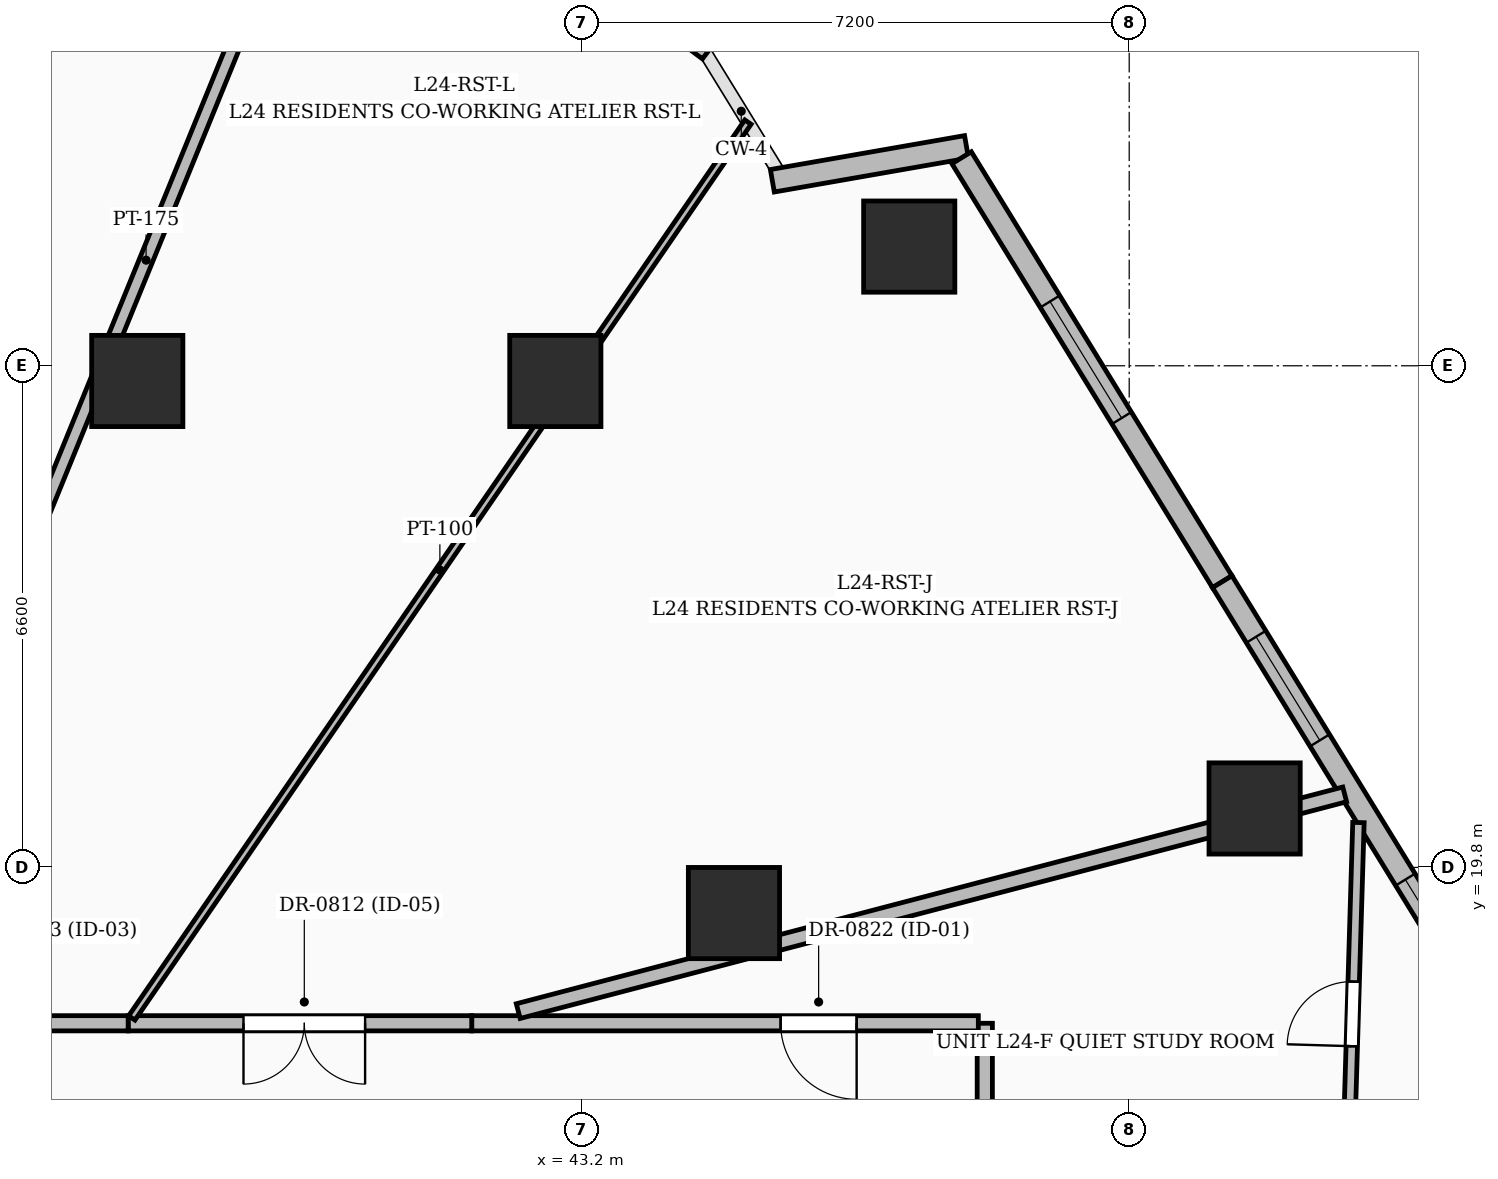
"""IFC4 building model, lengths in metres.
Left out: names, types, materials, properties, quantities, classifications, styles, units other than length and angle.
Written with IfcOpenShell. Run it as: python <this file> out.ifc"""

import sys

from ifc_helpers import new_model, si_unit, direction, frame, frame_2d, origin, origin_2d, place, context, subcontext, project, spatial, rectangle, extrude, element, fill, save


model = new_model("IFC4")
c1 = context("Model", 3, precision=1e-05, world=origin(), true_north=direction((0.0, 1.0)))
c2 = subcontext(c1, "Body", "Model", "MODEL_VIEW")
j1 = project(units=[si_unit("LENGTHUNIT", "METRE"), si_unit("PLANEANGLEUNIT", "RADIAN")], contexts=[c1])
p1 = place(None, origin())
s1 = spatial("IfcSite", under=j1, at=p1, CompositionType="ELEMENT")
p2 = place(p1, origin())
s2 = spatial("IfcBuilding", under=s1, at=p2, CompositionType="ELEMENT")
p3 = place(p2, frame((0.0, 0.0, 96.6)))
s3 = spatial("IfcBuildingStorey", under=s2, at=p3, CompositionType="ELEMENT", Elevation=96.6)
for number, where, z_axis, x_axis in (
    (1, (45.2, 19.2, 0.0), (0.0, 0.0, 1.0), (1.0, 0.0, 0.0)),
    (2, (42.85, 26.2, 0.0), (0.0, 0.0, 1.0), (1.0, 0.0, 0.0)),
    (3, (37.35, 26.2, 0.0), (0.0, 0.0, 1.0), (1.0, 0.0, 0.0)),
    (4, (52.05, 20.576, 0.0), (0.0, 0.0, 1.0), (1.0, 0.0, 0.0)),
    (5, (47.506, 27.968, 0.0), (0.0, 0.0, 1.0), (1.0, 0.0, 0.0)),
):
    element("IfcColumn", number, at=place(p3, frame(where, z_axis=z_axis, x_axis=x_axis)), inside=s3, PredefinedType="COLUMN", context=c2, shape_type="SweptSolid", body=[
        extrude(rectangle(XDim=1.2, YDim=1.2, at=origin_2d()), origin(), (0.0, 0.0, 1.0), 3.6),
    ])
p4 = place(p3, frame((46.051, 32.385, 0.0), z_axis=(0.0, 0.0, 1.0), x_axis=(-0.597942033265, -0.801539347041, 0.0)))
e6 = element("IfcWall", 6, at=p4, inside=s3, PredefinedType="SOLIDWALL", context=c2, shape_type="SweptSolid", body=[
    extrude(rectangle(XDim=2.318, YDim=0.3, at=frame_2d((1.159, 0.0))), origin(), (0.0, 0.0, 1.0), 2.325),
])
p5 = place(p3, frame((45.705, 28.834, 0.0), z_axis=(0.0, 0.0, 1.0), x_axis=(0.985100314999, 0.171980723889, 0.0)))
e7 = element("IfcWall", 7, at=p5, inside=s3, PredefinedType="SOLIDWALL", context=c2, shape_type="SweptSolid", body=[
    extrude(rectangle(XDim=2.594, YDim=0.3, at=frame_2d((1.297, 0.0))), origin(), (0.0, 0.0, 1.0), 2.325),
])
p6 = place(p3, frame((48.195, 29.137, 0.0), z_axis=(0.0, 0.0, 1.0), x_axis=(0.523689584933, -0.851909161022, 0.0)))
e8 = element("IfcWall", 8, at=p6, inside=s3, PredefinedType="SOLIDWALL", context=c2, shape_type="SweptSolid", body=[
    extrude(rectangle(XDim=6.547, YDim=0.3, at=frame_2d((3.273, 0.0))), origin(), (0.0, 0.0, 1.0), 3.3),
])
p7 = place(p6, frame((2.22, 0.0, 0.6)))
e9 = element("IfcOpeningElement", 9, at=p7, cuts=e8, PredefinedType="OPENING", context=c2, shape_type="SweptSolid", body=[
    extrude(rectangle(XDim=1.8, YDim=2.1, at=frame_2d((0.9, 1.05))), frame((0.0, 0.16, 0.0), z_axis=(0.0, -1.0, 0.0), x_axis=(1.0, 0.0, 0.0)), (0.0, 0.0, 1.0), 0.32),
])
p8 = place(p3, frame((51.624, 23.559, 0.0), z_axis=(0.0, 0.0, 1.0), x_axis=(0.52370032897, -0.851902556303, 0.0)))
e10 = element("IfcWall", 10, at=p8, inside=s3, PredefinedType="SOLIDWALL", context=c2, shape_type="SweptSolid", body=[
    extrude(rectangle(XDim=6.827, YDim=0.3, at=frame_2d((3.414, 0.0))), origin(), (0.0, 0.0, 1.0), 3.3),
])
p9 = place(p8, frame((4.6, 0.0, 0.55)))
e11 = element("IfcOpeningElement", 11, at=p9, cuts=e10, PredefinedType="OPENING", context=c2, shape_type="SweptSolid", body=[
    extrude(rectangle(XDim=1.6, YDim=2.2, at=frame_2d((0.8, 1.1))), frame((0.0, 0.16, 0.0), z_axis=(0.0, -1.0, 0.0), x_axis=(1.0, 0.0, 0.0)), (0.0, 0.0, 1.0), 0.32),
])
p10 = place(p8, frame((0.85, 0.0, 0.55)))
e12 = element("IfcOpeningElement", 12, at=p10, cuts=e10, PredefinedType="OPENING", context=c2, shape_type="SweptSolid", body=[
    extrude(rectangle(XDim=1.6, YDim=2.2, at=frame_2d((0.8, 1.1))), frame((0.0, 0.16, 0.0), z_axis=(0.0, -1.0, 0.0), x_axis=(1.0, 0.0, 0.0)), (0.0, 0.0, 1.0), 0.32),
])
p11 = place(p3, frame((48.5, 15.51, 0.0), z_axis=(0.0, 0.0, 1.0), x_axis=(0.0, 1.0, 0.0)))
e13 = element("IfcWall", 13, at=p11, inside=s3, PredefinedType="PARTITIONING", context=c2, shape_type="SweptSolid", body=[
    extrude(rectangle(XDim=2.24, YDim=0.2, at=frame_2d((1.12, 0.0))), origin(), (0.0, 0.0, 1.0), 2.295),
])
p12 = place(p3, frame((48.415, 17.75, 0.0), z_axis=(0.0, 0.0, 1.0), x_axis=(-1.0, 0.0, 0.0)))
e14 = element("IfcWall", 14, at=p12, inside=s3, PredefinedType="PARTITIONING", context=c2, shape_type="SweptSolid", body=[
    extrude(rectangle(XDim=6.665, YDim=0.2, at=frame_2d((3.333, 0.0))), origin(), (0.0, 0.0, 1.0), 2.259),
])
p13 = place(p12, frame((1.601, 0.0, 0.0)))
e15 = element("IfcOpeningElement", 15, at=p13, cuts=e14, PredefinedType="OPENING", context=c2, shape_type="SweptSolid", body=[
    extrude(rectangle(XDim=1.0, YDim=2.2, at=frame_2d((0.5, 1.1))), frame((0.0, 0.11, 0.0), z_axis=(0.0, -1.0, 0.0), x_axis=(1.0, 0.0, 0.0)), (0.0, 0.0, 1.0), 0.22),
])
p14 = place(p3, frame((41.75, 17.75, 0.0), z_axis=(0.0, 0.0, 1.0), x_axis=(-1.0, 0.0, 0.0)))
e16 = element("IfcWall", 16, at=p14, inside=s3, PredefinedType="PARTITIONING", context=c2, shape_type="SweptSolid", body=[
    extrude(rectangle(XDim=4.52, YDim=0.2, at=frame_2d((2.26, 0.0))), origin(), (0.0, 0.0, 1.0), 3.3),
])
p15 = place(p14, frame((1.403, 0.0, 0.0)))
e17 = element("IfcOpeningElement", 17, at=p15, cuts=e16, PredefinedType="OPENING", context=c2, shape_type="SweptSolid", body=[
    extrude(rectangle(XDim=1.6, YDim=2.3, at=frame_2d((0.8, 1.15))), frame((0.0, 0.11, 0.0), z_axis=(0.0, -1.0, 0.0), x_axis=(1.0, 0.0, 0.0)), (0.0, 0.0, 1.0), 0.22),
])
p16 = place(p3, frame((37.23, 17.75, 0.0), z_axis=(0.0, 0.0, 1.0), x_axis=(-1.0, 0.0, 0.0)))
e18 = element("IfcWall", 18, at=p16, inside=s3, PredefinedType="PARTITIONING", context=c2, shape_type="SweptSolid", body=[
    extrude(rectangle(XDim=3.86, YDim=0.2, at=frame_2d((1.93, 0.0))), origin(), (0.0, 0.0, 1.0), 2.259),
])
p17 = place(p16, frame((1.422, 0.0, 0.0)))
e19 = element("IfcOpeningElement", 19, at=p17, cuts=e18, PredefinedType="OPENING", context=c2, shape_type="SweptSolid", body=[
    extrude(rectangle(XDim=0.9, YDim=2.1, at=frame_2d((0.45, 1.05))), frame((0.0, 0.11, 0.0), z_axis=(0.0, -1.0, 0.0), x_axis=(1.0, 0.0, 0.0)), (0.0, 0.0, 1.0), 0.22),
])
p18 = place(p3, frame((53.26, 15.17, 0.0), z_axis=(0.0, 0.0, 1.0), x_axis=(0.029866031463, 0.999553910584, 0.0)))
e20 = element("IfcWall", 20, at=p18, inside=s3, PredefinedType="PARTITIONING", context=c2, shape_type="SweptSolid", body=[
    extrude(rectangle(XDim=5.224, YDim=0.15, at=frame_2d((2.612, 0.0))), origin(), (0.0, 0.0, 1.0), 2.32),
])
p19 = place(p18, frame((2.279, 0.0, 0.0)))
e21 = element("IfcOpeningElement", 21, at=p19, cuts=e20, PredefinedType="OPENING", context=c2, shape_type="SweptSolid", body=[
    extrude(rectangle(XDim=0.85, YDim=2.1, at=frame_2d((0.425, 1.05))), frame((0.0, 0.085, 0.0), z_axis=(0.0, -1.0, 0.0), x_axis=(1.0, 0.0, 0.0)), (0.0, 0.0, 1.0), 0.17),
])
p20 = place(p3, frame((53.235, 20.761, 0.0), z_axis=(0.0, 0.0, 1.0), x_axis=(-0.967298670581, -0.253640063657, 0.0)))
e22 = element("IfcWall", 22, at=p20, inside=s3, PredefinedType="PARTITIONING", context=c2, shape_type="SweptSolid", body=[
    extrude(rectangle(XDim=11.241, YDim=0.2, at=frame_2d((5.62, 0.0))), origin(), (0.0, 0.0, 1.0), 2.259),
])
p21 = place(p3, frame((38.205, 33.941, 0.0), z_axis=(0.0, 0.0, 1.0), x_axis=(-0.656942619395, -0.753940577779, 0.0)))
e23 = element("IfcWall", 23, at=p21, inside=s3, PredefinedType="PARTITIONING", context=c2, shape_type="SweptSolid", body=[
    extrude(rectangle(XDim=5.837, YDim=0.2, at=frame_2d((2.918, 0.0))), origin(), (0.0, 0.0, 1.0), 2.295),
])
p22 = place(p3, frame((33.402, 17.829, 0.0), z_axis=(0.0, 0.0, 1.0), x_axis=(0.377767569575, 0.925900460837, 0.0)))
e24 = element("IfcWall", 24, at=p22, inside=s3, PredefinedType="PARTITIONING", context=c2, shape_type="SweptSolid", body=[
    extrude(rectangle(XDim=21.516, YDim=0.175, at=frame_2d((10.758, 0.0))), origin(), (0.0, 0.0, 1.0), 2.259),
])
p23 = place(p3, frame((45.384, 29.606, 0.0), z_axis=(0.0, 0.0, 1.0), x_axis=(-0.566667167999, -0.823946794831, 0.0)))
e25 = element("IfcWall", 25, at=p23, inside=s3, PredefinedType="PARTITIONING", context=c2, shape_type="SweptSolid", body=[
    extrude(rectangle(XDim=14.304, YDim=0.1, at=frame_2d((7.152, 0.0))), origin(), (0.0, 0.0, 1.0), 2.81),
])
p24 = place(p7, origin())
e26 = element("IfcWindow", 26, at=p24, inside=s3, PartitioningType="SINGLE_PANEL", PredefinedType="WINDOW", context=c2, shape_type="SweptSolid", body=[
    extrude(rectangle(XDim=1.8, YDim=2.1, at=frame_2d((0.9, 1.05))), frame((0.0, 0.03, 0.0), z_axis=(0.0, -1.0, 0.0), x_axis=(1.0, 0.0, 0.0)), (0.0, 0.0, 1.0), 0.06),
])
fill(e9, e26)
p25 = place(p9, origin())
e27 = element("IfcWindow", 27, at=p25, inside=s3, PartitioningType="SINGLE_PANEL", PredefinedType="WINDOW", context=c2, shape_type="SweptSolid", body=[
    extrude(rectangle(XDim=1.6, YDim=2.2, at=frame_2d((0.8, 1.1))), frame((0.0, 0.03, 0.0), z_axis=(0.0, -1.0, 0.0), x_axis=(1.0, 0.0, 0.0)), (0.0, 0.0, 1.0), 0.06),
])
fill(e11, e27)
p26 = place(p10, origin())
e28 = element("IfcWindow", 28, at=p26, inside=s3, PartitioningType="SINGLE_PANEL", PredefinedType="WINDOW", context=c2, shape_type="SweptSolid", body=[
    extrude(rectangle(XDim=1.6, YDim=2.2, at=frame_2d((0.8, 1.1))), frame((0.0, 0.03, 0.0), z_axis=(0.0, -1.0, 0.0), x_axis=(1.0, 0.0, 0.0)), (0.0, 0.0, 1.0), 0.06),
])
fill(e12, e28)
p27 = place(p15, origin())
e29 = element("IfcDoor", 29, at=p27, inside=s3, OperationType="DOUBLE_DOOR_SINGLE_SWING", PredefinedType="DOOR", context=c2, shape_type="SweptSolid", body=[
    extrude(rectangle(XDim=1.6, YDim=2.3, at=frame_2d((0.8, 1.15))), frame((0.0, 0.025, 0.0), z_axis=(0.0, -1.0, 0.0), x_axis=(1.0, 0.0, 0.0)), (0.0, 0.0, 1.0), 0.05),
])
fill(e17, e29)
p28 = place(p13, origin())
e30 = element("IfcDoor", 30, at=p28, inside=s3, OperationType="SINGLE_SWING_LEFT", PredefinedType="DOOR", context=c2, shape_type="SweptSolid", body=[
    extrude(rectangle(XDim=1.0, YDim=2.2, at=frame_2d((0.5, 1.1))), frame((0.0, 0.025, 0.0), z_axis=(0.0, -1.0, 0.0), x_axis=(1.0, 0.0, 0.0)), (0.0, 0.0, 1.0), 0.05),
])
fill(e15, e30)
p29 = place(p19, origin())
e31 = element("IfcDoor", 31, at=p29, inside=s3, OperationType="SINGLE_SWING_LEFT", PredefinedType="DOOR", context=c2, shape_type="SweptSolid", body=[
    extrude(rectangle(XDim=0.85, YDim=2.1, at=frame_2d((0.425, 1.05))), frame((0.0, 0.025, 0.0), z_axis=(0.0, -1.0, 0.0), x_axis=(1.0, 0.0, 0.0)), (0.0, 0.0, 1.0), 0.05),
])
fill(e21, e31)
save(model, sys.argv[1])
